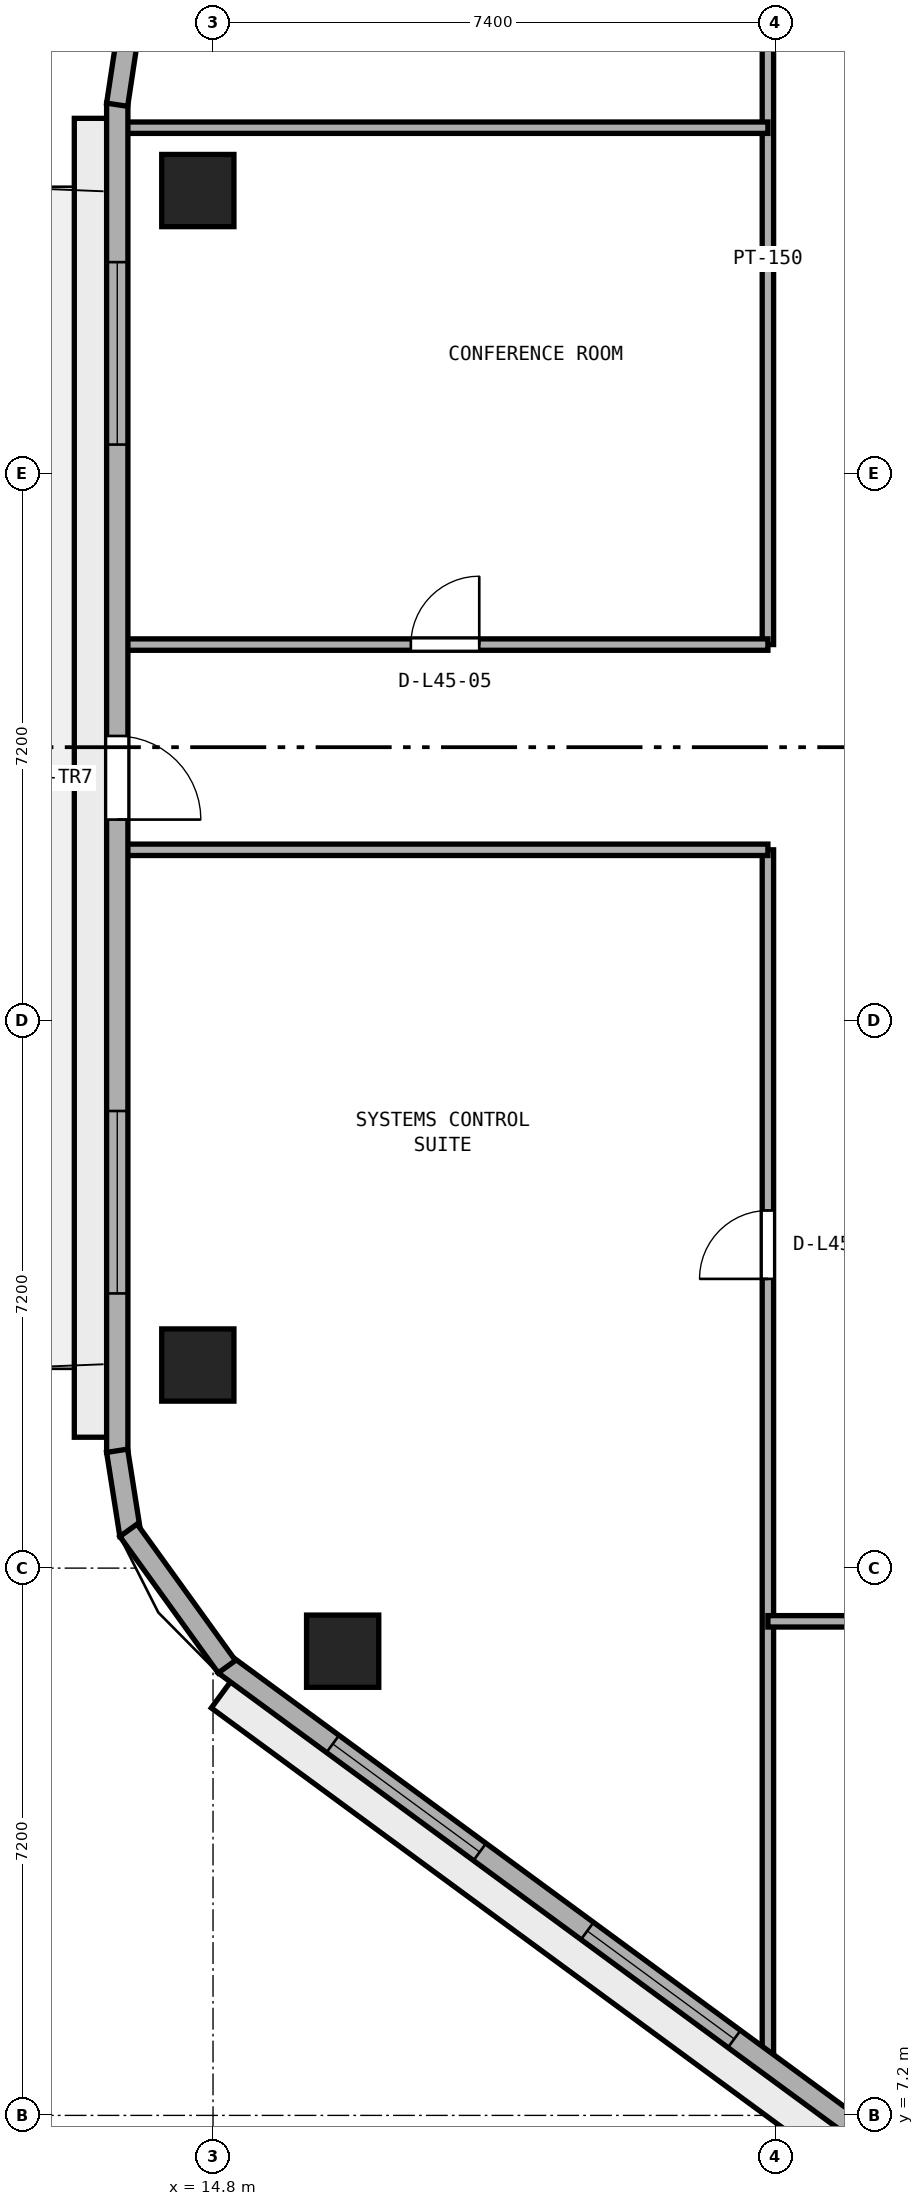
"""IFC4 building model, lengths in metres.
Left out: names, types, materials, properties, quantities, classifications, styles, units other than length and angle.
Written with IfcOpenShell. Run it as: python <this file> out.ifc"""

import sys

from ifc_helpers import new_model, si_unit, direction, frame, frame_2d, origin, origin_2d, place, context, subcontext, project, spatial, rectangle, extrude, element, fill, save


model = new_model("IFC4")
c1 = context("Model", 3, precision=1e-05, world=origin(), true_north=direction((0.0, 1.0)))
c2 = subcontext(c1, "Body", "Model", "MODEL_VIEW")
j1 = project(units=[si_unit("LENGTHUNIT", "METRE"), si_unit("PLANEANGLEUNIT", "RADIAN")], contexts=[c1])
p1 = place(None, origin())
s1 = spatial("IfcSite", under=j1, at=p1, CompositionType="ELEMENT")
p2 = place(p1, origin())
s2 = spatial("IfcBuilding", under=s1, at=p2, CompositionType="ELEMENT")
p3 = place(p2, frame((0.0, 0.0, 178.2)))
s3 = spatial("IfcBuildingStorey", under=s2, at=p3, CompositionType="ELEMENT", Elevation=178.2)
for number, where, z_axis, x_axis in (
    (1, (14.6, 32.523, 0.0), (0.0, 0.0, 1.0), (1.0, 0.0, 0.0)),
    (2, (14.6, 17.072, 0.0), (0.0, 0.0, 1.0), (1.0, 0.0, 0.0)),
    (3, (16.505, 13.307, 0.0), (0.0, 0.0, 1.0), (1.0, 0.0, 0.0)),
):
    element("IfcColumn", number, at=place(p3, frame(where, z_axis=z_axis, x_axis=x_axis)), inside=s3, PredefinedType="COLUMN", context=c2, shape_type="SweptSolid", body=[
        extrude(rectangle(XDim=0.95, YDim=0.95, at=origin_2d()), origin(), (0.0, 0.0, 1.0), 3.8),
    ])
p4 = place(p3, frame((22.1, 7.846, 0.0), z_axis=(0.0, 0.0, 1.0), x_axis=(0.0, 1.0, 0.0)))
e4 = element("IfcWall", 4, at=p4, inside=s3, PredefinedType="PARTITIONING", context=c2, shape_type="SweptSolid", body=[
    extrude(rectangle(XDim=16.004, YDim=0.15, at=frame_2d((8.002, 0.0))), origin(), (0.0, 0.0, 1.0), 3.54),
])
p5 = place(p4, frame((10.359, 0.0, 0.0)))
e5 = element("IfcOpeningElement", 5, at=p5, cuts=e4, PredefinedType="OPENING", context=c2, shape_type="SweptSolid", body=[
    extrude(rectangle(XDim=0.9, YDim=2.1, at=frame_2d((0.45, 1.05))), frame((0.0, 0.085, 0.0), z_axis=(0.0, -1.0, 0.0), x_axis=(1.0, 0.0, 0.0)), (0.0, 0.0, 1.0), 0.17),
])
p6 = place(p3, frame((22.1, 26.55, 0.0), z_axis=(0.0, 0.0, 1.0), x_axis=(0.0, 1.0, 0.0)))
e6 = element("IfcWall", 6, at=p6, inside=s3, PredefinedType="PARTITIONING", context=c2, shape_type="SweptSolid", body=[
    extrude(rectangle(XDim=10.15, YDim=0.15, at=frame_2d((5.075, 0.0))), origin(), (0.0, 0.0, 1.0), 3.54),
])
p7 = place(p3, frame((22.1, 13.7, 0.0), z_axis=(0.0, 0.0, 1.0), x_axis=(1.0, 0.0, 0.0)))
e7 = element("IfcWall", 7, at=p7, inside=s3, PredefinedType="PARTITIONING", context=c2, shape_type="SweptSolid", body=[
    extrude(rectangle(XDim=12.3, YDim=0.15, at=frame_2d((6.15, 0.0))), origin(), (0.0, 0.0, 1.0), 3.54),
])
p8 = place(p7, frame((4.37, 0.0, 0.0)))
e8 = element("IfcOpeningElement", 8, at=p8, cuts=e7, PredefinedType="OPENING", context=c2, shape_type="SweptSolid", body=[
    extrude(rectangle(XDim=0.9, YDim=2.1, at=frame_2d((0.45, 1.05))), frame((0.0, 0.085, 0.0), z_axis=(0.0, -1.0, 0.0), x_axis=(1.0, 0.0, 0.0)), (0.0, 0.0, 1.0), 0.17),
])
p9 = place(p3, frame((13.605, 23.85, 0.0), z_axis=(0.0, 0.0, 1.0), x_axis=(1.0, 0.0, 0.0)))
e9 = element("IfcWall", 9, at=p9, inside=s3, PredefinedType="PARTITIONING", context=c2, shape_type="SweptSolid", body=[
    extrude(rectangle(XDim=8.495, YDim=0.15, at=frame_2d((4.248, 0.0))), origin(), (0.0, 0.0, 1.0), 3.54),
])
p10 = place(p3, frame((13.605, 26.55, 0.0), z_axis=(0.0, 0.0, 1.0), x_axis=(1.0, 0.0, 0.0)))
e10 = element("IfcWall", 10, at=p10, inside=s3, PredefinedType="PARTITIONING", context=c2, shape_type="SweptSolid", body=[
    extrude(rectangle(XDim=8.495, YDim=0.15, at=frame_2d((4.248, 0.0))), origin(), (0.0, 0.0, 1.0), 3.54),
])
p11 = place(p10, frame((3.798, 0.0, 0.0)))
e11 = element("IfcOpeningElement", 11, at=p11, cuts=e10, PredefinedType="OPENING", context=c2, shape_type="SweptSolid", body=[
    extrude(rectangle(XDim=0.9, YDim=2.1, at=frame_2d((0.45, 1.05))), frame((0.0, 0.085, 0.0), z_axis=(0.0, -1.0, 0.0), x_axis=(1.0, 0.0, 0.0)), (0.0, 0.0, 1.0), 0.17),
])
p12 = place(p3, frame((13.605, 33.35, 0.0), z_axis=(0.0, 0.0, 1.0), x_axis=(1.0, 0.0, 0.0)))
e12 = element("IfcWall", 12, at=p12, inside=s3, PredefinedType="PARTITIONING", context=c2, shape_type="SweptSolid", body=[
    extrude(rectangle(XDim=8.495, YDim=0.15, at=frame_2d((4.248, 0.0))), origin(), (0.0, 0.0, 1.0), 3.54),
])
p13 = place(p3, frame((13.54, 33.673, 0.0), z_axis=(0.0, 0.0, 1.0), x_axis=(0.0, -1.0, 0.0)))
e13 = element("IfcWall", 13, at=p13, inside=s3, PredefinedType="STANDARD", context=c2, shape_type="SweptSolid", body=[
    extrude(rectangle(XDim=17.751, YDim=0.28, at=frame_2d((8.875, 0.0))), origin(), (0.0, 0.0, 1.0), 3.54),
])
p14 = place(p13, frame((8.326, 0.0, 0.0)))
e14 = element("IfcOpeningElement", 14, at=p14, cuts=e13, PredefinedType="OPENING", context=c2, shape_type="SweptSolid", body=[
    extrude(rectangle(XDim=1.1, YDim=2.2, at=frame_2d((0.55, 1.1))), frame((0.0, 0.15, 0.0), z_axis=(0.0, -1.0, 0.0), x_axis=(1.0, 0.0, 0.0)), (0.0, 0.0, 1.0), 0.3),
])
p15 = place(p13, frame((2.092, 0.0, 0.9)))
e15 = element("IfcOpeningElement", 15, at=p15, cuts=e13, PredefinedType="OPENING", context=c2, shape_type="SweptSolid", body=[
    extrude(rectangle(XDim=2.4, YDim=1.75, at=frame_2d((1.2, 0.875))), frame((0.0, 0.15, 0.0), z_axis=(0.0, -1.0, 0.0), x_axis=(1.0, 0.0, 0.0)), (0.0, 0.0, 1.0), 0.3),
])
p16 = place(p13, frame((13.26, 0.0, 0.9)))
e16 = element("IfcOpeningElement", 16, at=p16, cuts=e13, PredefinedType="OPENING", context=c2, shape_type="SweptSolid", body=[
    extrude(rectangle(XDim=2.4, YDim=1.75, at=frame_2d((1.2, 0.875))), frame((0.0, 0.15, 0.0), z_axis=(0.0, -1.0, 0.0), x_axis=(1.0, 0.0, 0.0)), (0.0, 0.0, 1.0), 0.3),
])
p17 = place(p3, frame((14.951, 13.134, 0.0), z_axis=(0.0, 0.0, 1.0), x_axis=(0.805804940328, -0.592181051827, 0.0)))
e17 = element("IfcWall", 17, at=p17, inside=s3, PredefinedType="STANDARD", context=c2, shape_type="SweptSolid", body=[
    extrude(rectangle(XDim=15.804, YDim=0.28, at=frame_2d((7.902, 0.0))), origin(), (0.0, 0.0, 1.0), 3.54),
])
p18 = place(p17, frame((1.767, 0.0, 0.9)))
e18 = element("IfcOpeningElement", 18, at=p18, cuts=e17, PredefinedType="OPENING", context=c2, shape_type="SweptSolid", body=[
    extrude(rectangle(XDim=2.4, YDim=1.75, at=frame_2d((1.2, 0.875))), frame((0.0, 0.15, 0.0), z_axis=(0.0, -1.0, 0.0), x_axis=(1.0, 0.0, 0.0)), (0.0, 0.0, 1.0), 0.3),
])
p19 = place(p17, frame((5.922, 0.0, 0.9)))
e19 = element("IfcOpeningElement", 19, at=p19, cuts=e17, PredefinedType="OPENING", context=c2, shape_type="SweptSolid", body=[
    extrude(rectangle(XDim=2.4, YDim=1.75, at=frame_2d((1.2, 0.875))), frame((0.0, 0.15, 0.0), z_axis=(0.0, -1.0, 0.0), x_axis=(1.0, 0.0, 0.0)), (0.0, 0.0, 1.0), 0.3),
])
p20 = place(p17, frame((11.637, 0.0, 0.9)))
e20 = element("IfcOpeningElement", 20, at=p20, cuts=e17, PredefinedType="OPENING", context=c2, shape_type="SweptSolid", body=[
    extrude(rectangle(XDim=2.4, YDim=1.75, at=frame_2d((1.2, 0.875))), frame((0.0, 0.15, 0.0), z_axis=(0.0, -1.0, 0.0), x_axis=(1.0, 0.0, 0.0)), (0.0, 0.0, 1.0), 0.3),
])
p21 = place(p3, frame((13.699, 34.716, 0.0), z_axis=(0.0, 0.0, 1.0), x_axis=(-0.149549920187, -0.988754176412, 0.0)))
e21 = element("IfcWall", 21, at=p21, inside=s3, PredefinedType="STANDARD", context=c2, shape_type="SweptSolid", body=[
    extrude(rectangle(XDim=1.076, YDim=0.28, at=frame_2d((0.538, 0.0))), origin(), (0.0, 0.0, 1.0), 3.54),
])
p22 = place(p3, frame((13.538, 15.944, 0.0), z_axis=(0.0, 0.0, 1.0), x_axis=(0.155447556013, -0.987844146275, 0.0)))
e22 = element("IfcWall", 22, at=p22, inside=s3, PredefinedType="STANDARD", context=c2, shape_type="SweptSolid", body=[
    extrude(rectangle(XDim=1.12, YDim=0.28, at=frame_2d((0.56, 0.0))), origin(), (0.0, 0.0, 1.0), 3.54),
])
p23 = place(p3, frame((13.688, 14.898, 0.0), z_axis=(0.0, 0.0, 1.0), x_axis=(0.584833657716, -0.811153248655, 0.0)))
e23 = element("IfcWall", 23, at=p23, inside=s3, PredefinedType="STANDARD", context=c2, shape_type="SweptSolid", body=[
    extrude(rectangle(XDim=2.212, YDim=0.28, at=frame_2d((1.106, 0.0))), origin(), (0.0, 0.0, 1.0), 3.54),
])
p24 = place(p5, origin())
e24 = element("IfcDoor", 24, at=p24, inside=s3, OperationType="SINGLE_SWING_LEFT", PredefinedType="DOOR", context=c2, shape_type="SweptSolid", body=[
    extrude(rectangle(XDim=0.9, YDim=2.1, at=frame_2d((0.45, 1.05))), frame((0.0, 0.025, 0.0), z_axis=(0.0, -1.0, 0.0), x_axis=(1.0, 0.0, 0.0)), (0.0, 0.0, 1.0), 0.05),
])
fill(e5, e24)
p25 = place(p11, origin())
e25 = element("IfcDoor", 25, at=p25, inside=s3, OperationType="SINGLE_SWING_RIGHT", PredefinedType="DOOR", context=c2, shape_type="SweptSolid", body=[
    extrude(rectangle(XDim=0.9, YDim=2.1, at=frame_2d((0.45, 1.05))), frame((0.0, 0.025, 0.0), z_axis=(0.0, -1.0, 0.0), x_axis=(1.0, 0.0, 0.0)), (0.0, 0.0, 1.0), 0.05),
])
fill(e11, e25)
p26 = place(p14, origin())
e26 = element("IfcDoor", 26, at=p26, inside=s3, OperationType="SINGLE_SWING_RIGHT", PredefinedType="DOOR", context=c2, shape_type="SweptSolid", body=[
    extrude(rectangle(XDim=1.1, YDim=2.2, at=frame_2d((0.55, 1.1))), frame((0.0, 0.025, 0.0), z_axis=(0.0, -1.0, 0.0), x_axis=(1.0, 0.0, 0.0)), (0.0, 0.0, 1.0), 0.05),
])
fill(e14, e26)
p27 = place(p15, origin())
e27 = element("IfcWindow", 27, at=p27, inside=s3, PartitioningType="SINGLE_PANEL", PredefinedType="WINDOW", context=c2, shape_type="SweptSolid", body=[
    extrude(rectangle(XDim=2.4, YDim=1.75, at=frame_2d((1.2, 0.875))), frame((0.0, 0.03, 0.0), z_axis=(0.0, -1.0, 0.0), x_axis=(1.0, 0.0, 0.0)), (0.0, 0.0, 1.0), 0.06),
])
fill(e15, e27)
p28 = place(p16, origin())
e28 = element("IfcWindow", 28, at=p28, inside=s3, PartitioningType="SINGLE_PANEL", PredefinedType="WINDOW", context=c2, shape_type="SweptSolid", body=[
    extrude(rectangle(XDim=2.4, YDim=1.75, at=frame_2d((1.2, 0.875))), frame((0.0, 0.03, 0.0), z_axis=(0.0, -1.0, 0.0), x_axis=(1.0, 0.0, 0.0)), (0.0, 0.0, 1.0), 0.06),
])
fill(e16, e28)
p29 = place(p18, origin())
e29 = element("IfcWindow", 29, at=p29, inside=s3, PartitioningType="SINGLE_PANEL", PredefinedType="WINDOW", context=c2, shape_type="SweptSolid", body=[
    extrude(rectangle(XDim=2.4, YDim=1.75, at=frame_2d((1.2, 0.875))), frame((0.0, 0.03, 0.0), z_axis=(0.0, -1.0, 0.0), x_axis=(1.0, 0.0, 0.0)), (0.0, 0.0, 1.0), 0.06),
])
fill(e18, e29)
p30 = place(p19, origin())
e30 = element("IfcWindow", 30, at=p30, inside=s3, PartitioningType="SINGLE_PANEL", PredefinedType="WINDOW", context=c2, shape_type="SweptSolid", body=[
    extrude(rectangle(XDim=2.4, YDim=1.75, at=frame_2d((1.2, 0.875))), frame((0.0, 0.03, 0.0), z_axis=(0.0, -1.0, 0.0), x_axis=(1.0, 0.0, 0.0)), (0.0, 0.0, 1.0), 0.06),
])
fill(e19, e30)
save(model, sys.argv[1])
